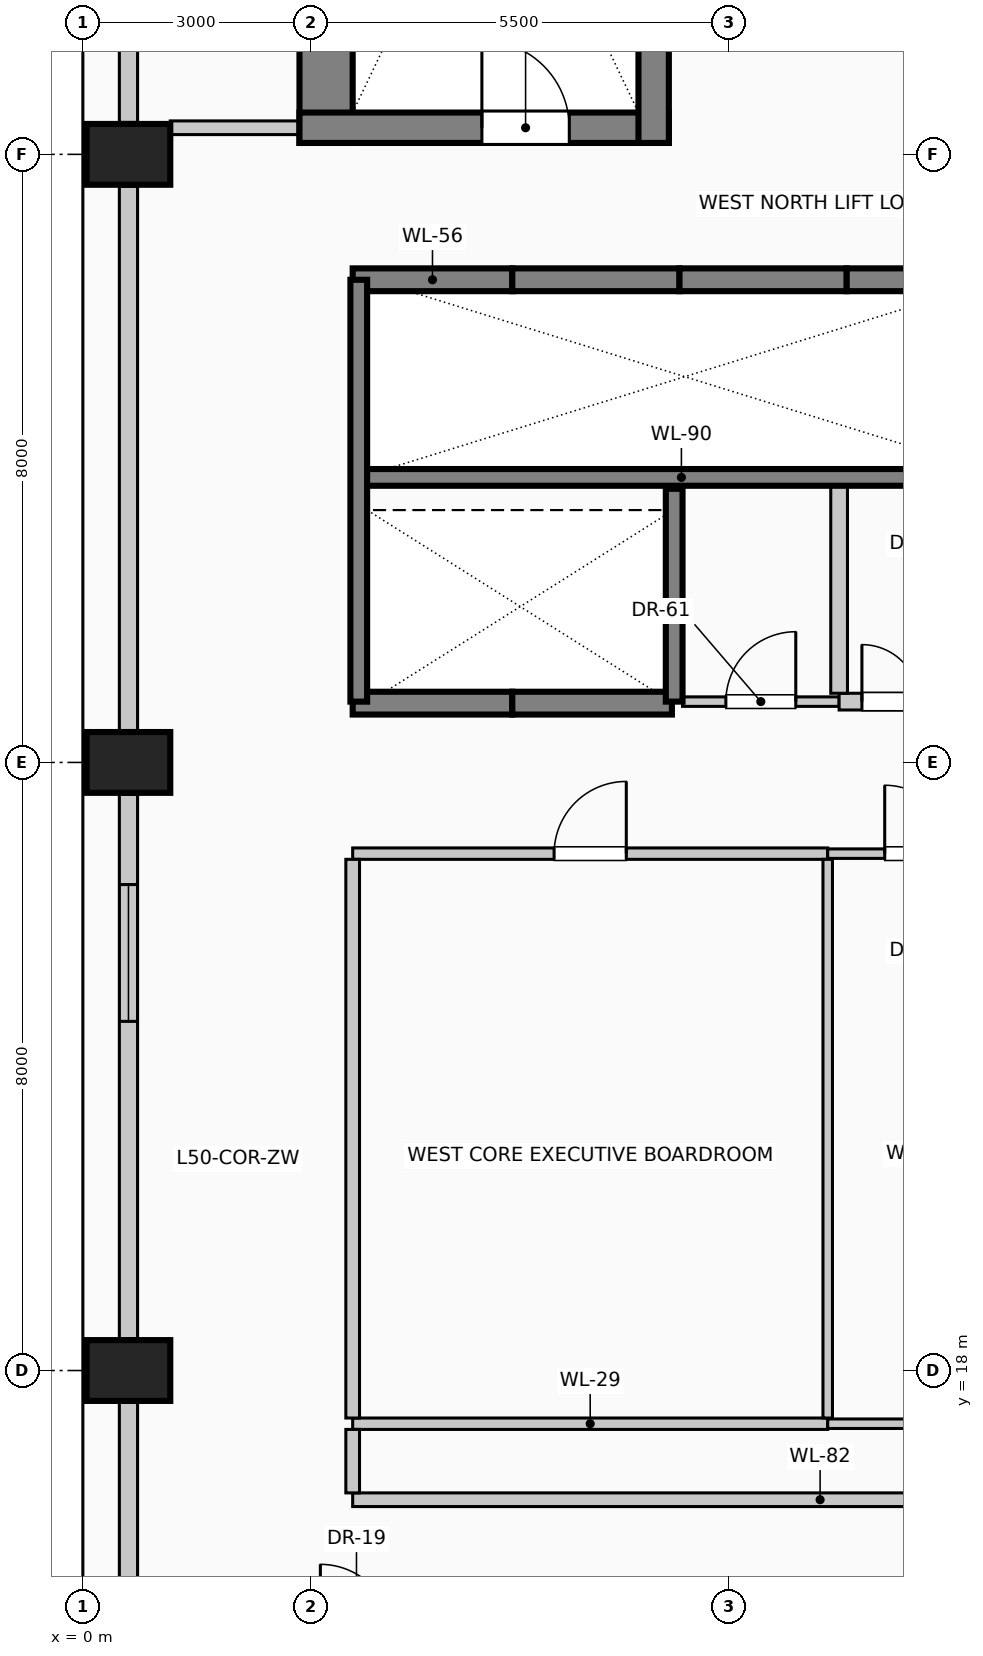
"""IFC4 building model, lengths in metres.
Left out: names, types, materials, properties, quantities, classifications, styles, units other than length and angle.
Written with IfcOpenShell. Run it as: python <this file> out.ifc"""

import sys

from ifc_helpers import new_model, si_unit, direction, frame, frame_2d, origin, origin_2d, place, context, subcontext, project, spatial, rectangle, extrude, element, fill, save


model = new_model("IFC4")
c1 = context("Model", 3, precision=1e-05, world=origin(), true_north=direction((0.0, 1.0)))
c2 = subcontext(c1, "Body", "Model", "MODEL_VIEW")
j1 = project(units=[si_unit("LENGTHUNIT", "METRE"), si_unit("PLANEANGLEUNIT", "RADIAN")], contexts=[c1])
p1 = place(None, origin())
s1 = spatial("IfcSite", under=j1, at=p1, CompositionType="ELEMENT")
p2 = place(p1, origin())
s2 = spatial("IfcBuilding", under=s1, at=p2, CompositionType="ELEMENT")
p3 = place(p2, frame((0.0, 0.0, 206.6)))
s3 = spatial("IfcBuildingStorey", under=s2, at=p3, CompositionType="ELEMENT", Elevation=206.6)
p4 = place(p3, frame((3.2, 34.15, 0.0), z_axis=(0.0, 0.0, 1.0), x_axis=(0.0, 1.0, 0.0)))
e1 = element("IfcWall", 1, at=p4, inside=s3, PredefinedType="SHEAR", context=c2, shape_type="SweptSolid", body=[
    extrude(rectangle(XDim=8.98, YDim=0.7, at=frame_2d((4.49, 0.0))), origin(), (0.0, 0.0, 1.0), 4.0),
])
p5 = place(p3, frame((2.85, 34.35, 0.0), z_axis=(0.0, 0.0, 1.0), x_axis=(1.0, 0.0, 0.0)))
e2 = element("IfcWall", 2, at=p5, inside=s3, PredefinedType="SHEAR", context=c2, shape_type="SweptSolid", body=[
    extrude(rectangle(XDim=4.86, YDim=0.4, at=frame_2d((2.43, 0.0))), origin(), (0.0, 0.0, 1.0), 4.0),
])
p6 = place(p5, frame((2.4, 0.0, 0.0)))
e3 = element("IfcOpeningElement", 3, at=p6, cuts=e2, PredefinedType="OPENING", context=c2, shape_type="SweptSolid", body=[
    extrude(rectangle(XDim=1.15, YDim=2.2, at=frame_2d((0.575, 1.1))), frame((0.0, 0.21, 0.0), z_axis=(0.0, -1.0, 0.0), x_axis=(1.0, 0.0, 0.0)), (0.0, 0.0, 1.0), 0.42),
])
p7 = place(p3, frame((7.51, 34.15, 0.0), z_axis=(0.0, 0.0, 1.0), x_axis=(0.0, 1.0, 0.0)))
e4 = element("IfcWall", 4, at=p7, inside=s3, PredefinedType="SHEAR", context=c2, shape_type="SweptSolid", body=[
    extrude(rectangle(XDim=8.98, YDim=0.4, at=frame_2d((4.49, 0.0))), origin(), (0.0, 0.0, 1.0), 4.0),
])
for number, where, z_axis, x_axis in (
    (5, (0.6, 18.0, 0.0), (0.0, 0.0, 1.0), (0.0, 1.0, 0.0)),
    (6, (0.6, 26.0, 0.0), (0.0, 0.0, 1.0), (0.0, 1.0, 0.0)),
    (7, (0.6, 34.0, 0.0), (0.0, 0.0, 1.0), (0.0, 1.0, 0.0)),
):
    element("IfcColumn", number, at=place(p3, frame(where, z_axis=z_axis, x_axis=x_axis)), inside=s3, PredefinedType="COLUMN", context=c2, shape_type="SweptSolid", body=[
        extrude(rectangle(XDim=0.8, YDim=1.1, at=origin_2d()), origin(), (0.0, 0.0, 1.0), 4.0),
    ])
p8 = place(p3, frame((0.6, 10.42, 0.0), z_axis=(0.0, 0.0, 1.0), x_axis=(0.0, 1.0, 0.0)))
e8 = element("IfcWall", 8, at=p8, inside=s3, PredefinedType="SOLIDWALL", context=c2, shape_type="SweptSolid", body=[
    extrude(rectangle(XDim=7.16, YDim=0.24, at=frame_2d((3.58, 0.0))), origin(), (0.0, 0.0, 1.0), 3.0),
])
p9 = place(p8, frame((1.187, 0.0, 0.42)))
e9 = element("IfcOpeningElement", 9, at=p9, cuts=e8, PredefinedType="OPENING", context=c2, shape_type="SweptSolid", body=[
    extrude(rectangle(XDim=1.8, YDim=2.2, at=frame_2d((0.9, 1.1))), frame((0.0, 0.13, 0.0), z_axis=(0.0, -1.0, 0.0), x_axis=(1.0, 0.0, 0.0)), (0.0, 0.0, 1.0), 0.26),
])
p10 = place(p3, frame((0.6, 18.42, 0.0), z_axis=(0.0, 0.0, 1.0), x_axis=(0.0, 1.0, 0.0)))
e10 = element("IfcWall", 10, at=p10, inside=s3, PredefinedType="SOLIDWALL", context=c2, shape_type="SweptSolid", body=[
    extrude(rectangle(XDim=7.16, YDim=0.24, at=frame_2d((3.58, 0.0))), origin(), (0.0, 0.0, 1.0), 3.0),
])
p11 = place(p10, frame((4.173, 0.0, 0.42)))
e11 = element("IfcOpeningElement", 11, at=p11, cuts=e10, PredefinedType="OPENING", context=c2, shape_type="SweptSolid", body=[
    extrude(rectangle(XDim=1.8, YDim=2.2, at=frame_2d((0.9, 1.1))), frame((0.0, 0.13, 0.0), z_axis=(0.0, -1.0, 0.0), x_axis=(1.0, 0.0, 0.0)), (0.0, 0.0, 1.0), 0.26),
])
p12 = place(p3, frame((0.6, 26.42, 0.0), z_axis=(0.0, 0.0, 1.0), x_axis=(0.0, 1.0, 0.0)))
e12 = element("IfcWall", 12, at=p12, inside=s3, PredefinedType="SOLIDWALL", context=c2, shape_type="SweptSolid", body=[
    extrude(rectangle(XDim=7.16, YDim=0.24, at=frame_2d((3.58, 0.0))), origin(), (0.0, 0.0, 1.0), 3.0),
])
p13 = place(p3, frame((0.6, 34.42, 0.0), z_axis=(0.0, 0.0, 1.0), x_axis=(0.0, 1.0, 0.0)))
e13 = element("IfcWall", 13, at=p13, inside=s3, PredefinedType="SOLIDWALL", context=c2, shape_type="SweptSolid", body=[
    extrude(rectangle(XDim=7.56, YDim=0.24, at=frame_2d((3.78, 0.0))), origin(), (0.0, 0.0, 1.0), 3.0),
])
p14 = place(p3, frame((3.55, 32.35, 0.0), z_axis=(0.0, 0.0, 1.0), x_axis=(1.0, 0.0, 0.0)))
e14 = element("IfcWall", 14, at=p14, inside=s3, PredefinedType="SOLIDWALL", context=c2, shape_type="SweptSolid", body=[
    extrude(rectangle(XDim=2.1, YDim=0.3, at=frame_2d((1.05, 0.0))), origin(), (0.0, 0.0, 1.0), 4.0),
])
p15 = place(p3, frame((5.65, 32.35, 0.0), z_axis=(0.0, 0.0, 1.0), x_axis=(1.0, 0.0, 0.0)))
e15 = element("IfcWall", 15, at=p15, inside=s3, PredefinedType="SOLIDWALL", context=c2, shape_type="SweptSolid", body=[
    extrude(rectangle(XDim=2.2, YDim=0.3, at=frame_2d((1.1, 0.0))), origin(), (0.0, 0.0, 1.0), 4.0),
])
p16 = place(p3, frame((7.85, 32.35, 0.0), z_axis=(0.0, 0.0, 1.0), x_axis=(1.0, 0.0, 0.0)))
e16 = element("IfcWall", 16, at=p16, inside=s3, PredefinedType="SOLIDWALL", context=c2, shape_type="SweptSolid", body=[
    extrude(rectangle(XDim=2.2, YDim=0.3, at=frame_2d((1.1, 0.0))), origin(), (0.0, 0.0, 1.0), 4.0),
])
p17 = place(p3, frame((10.05, 32.35, 0.0), z_axis=(0.0, 0.0, 1.0), x_axis=(1.0, 0.0, 0.0)))
e17 = element("IfcWall", 17, at=p17, inside=s3, PredefinedType="SOLIDWALL", context=c2, shape_type="SweptSolid", body=[
    extrude(rectangle(XDim=2.15, YDim=0.3, at=frame_2d((1.075, 0.0))), origin(), (0.0, 0.0, 1.0), 4.0),
])
p18 = place(p3, frame((5.65, 26.78, 0.0), z_axis=(0.0, 0.0, 1.0), x_axis=(-1.0, 0.0, 0.0)))
e18 = element("IfcWall", 18, at=p18, inside=s3, PredefinedType="SOLIDWALL", context=c2, shape_type="SweptSolid", body=[
    extrude(rectangle(XDim=2.1, YDim=0.3, at=frame_2d((1.05, 0.0))), origin(), (0.0, 0.0, 1.0), 4.0),
])
p19 = place(p3, frame((7.75, 26.78, 0.0), z_axis=(0.0, 0.0, 1.0), x_axis=(-1.0, 0.0, 0.0)))
e19 = element("IfcWall", 19, at=p19, inside=s3, PredefinedType="SOLIDWALL", context=c2, shape_type="SweptSolid", body=[
    extrude(rectangle(XDim=2.1, YDim=0.3, at=frame_2d((1.05, 0.0))), origin(), (0.0, 0.0, 1.0), 4.0),
])
p20 = place(p3, frame((3.55, 29.75, 0.0), z_axis=(0.0, 0.0, 1.0), x_axis=(1.0, 0.0, 0.0)))
e20 = element("IfcWall", 20, at=p20, inside=s3, PredefinedType="SOLIDWALL", context=c2, shape_type="SweptSolid", body=[
    extrude(rectangle(XDim=8.65, YDim=0.22, at=frame_2d((4.325, 0.0))), origin(), (0.0, 0.0, 1.0), 4.0),
])
p21 = place(p3, frame((3.63, 26.8, 0.0), z_axis=(0.0, 0.0, 1.0), x_axis=(0.0, 1.0, 0.0)))
e21 = element("IfcWall", 21, at=p21, inside=s3, PredefinedType="SOLIDWALL", context=c2, shape_type="SweptSolid", body=[
    extrude(rectangle(XDim=5.55, YDim=0.22, at=frame_2d((2.775, 0.0))), origin(), (0.0, 0.0, 1.0), 4.0),
])
p22 = place(p3, frame((7.78, 26.8, 0.0), z_axis=(0.0, 0.0, 1.0), x_axis=(0.0, 1.0, 0.0)))
e22 = element("IfcWall", 22, at=p22, inside=s3, PredefinedType="SOLIDWALL", context=c2, shape_type="SweptSolid", body=[
    extrude(rectangle(XDim=2.8, YDim=0.22, at=frame_2d((1.4, 0.0))), origin(), (0.0, 0.0, 1.0), 4.0),
])
p23 = place(p3, frame((3.55, 16.3, 0.0), z_axis=(0.0, 0.0, 1.0), x_axis=(1.0, 0.0, 0.0)))
e23 = element("IfcWall", 23, at=p23, inside=s3, PredefinedType="PARTITIONING", context=c2, shape_type="SweptSolid", body=[
    extrude(rectangle(XDim=12.3, YDim=0.18, at=frame_2d((6.15, 0.0))), origin(), (0.0, 0.0, 1.0), 3.75),
])
p24 = place(p3, frame((3.55, 17.3, 0.0), z_axis=(0.0, 0.0, 1.0), x_axis=(1.0, 0.0, 0.0)))
e24 = element("IfcWall", 24, at=p24, inside=s3, PredefinedType="PARTITIONING", context=c2, shape_type="SweptSolid", body=[
    extrude(rectangle(XDim=6.25, YDim=0.15, at=frame_2d((3.125, 0.0))), origin(), (0.0, 0.0, 1.0), 3.75),
])
p25 = place(p3, frame((9.8, 17.3, 0.0), z_axis=(0.0, 0.0, 1.0), x_axis=(1.0, 0.0, 0.0)))
e25 = element("IfcWall", 25, at=p25, inside=s3, PredefinedType="PARTITIONING", context=c2, shape_type="SweptSolid", body=[
    extrude(rectangle(XDim=6.05, YDim=0.125, at=frame_2d((3.025, 0.0))), origin(), (0.0, 0.0, 1.0), 3.75),
])
p26 = place(p3, frame((3.55, 24.8, 0.0), z_axis=(0.0, 0.0, 1.0), x_axis=(1.0, 0.0, 0.0)))
e26 = element("IfcWall", 26, at=p26, inside=s3, PredefinedType="PARTITIONING", context=c2, shape_type="SweptSolid", body=[
    extrude(rectangle(XDim=6.25, YDim=0.15, at=frame_2d((3.125, 0.0))), origin(), (0.0, 0.0, 1.0), 3.75),
])
p27 = place(p26, frame((2.65, 0.0, 0.0)))
e27 = element("IfcOpeningElement", 27, at=p27, cuts=e26, PredefinedType="OPENING", context=c2, shape_type="SweptSolid", body=[
    extrude(rectangle(XDim=0.95, YDim=2.15, at=frame_2d((0.475, 1.075))), frame((0.0, 0.085, 0.0), z_axis=(0.0, -1.0, 0.0), x_axis=(1.0, 0.0, 0.0)), (0.0, 0.0, 1.0), 0.17),
])
p28 = place(p3, frame((9.8, 24.8, 0.0), z_axis=(0.0, 0.0, 1.0), x_axis=(1.0, 0.0, 0.0)))
e28 = element("IfcWall", 28, at=p28, inside=s3, PredefinedType="PARTITIONING", context=c2, shape_type="SweptSolid", body=[
    extrude(rectangle(XDim=2.4, YDim=0.125, at=frame_2d((1.2, 0.0))), origin(), (0.0, 0.0, 1.0), 3.75),
])
p29 = place(p28, frame((0.75, 0.0, 0.0)))
e29 = element("IfcOpeningElement", 29, at=p29, cuts=e28, PredefinedType="OPENING", context=c2, shape_type="SweptSolid", body=[
    extrude(rectangle(XDim=0.9, YDim=2.1, at=frame_2d((0.45, 1.05))), frame((0.0, 0.073, 0.0), z_axis=(0.0, -1.0, 0.0), x_axis=(1.0, 0.0, 0.0)), (0.0, 0.0, 1.0), 0.145),
])
p30 = place(p3, frame((7.89, 26.8, 0.0), z_axis=(0.0, 0.0, 1.0), x_axis=(1.0, 0.0, 0.0)))
e30 = element("IfcWall", 30, at=p30, inside=s3, PredefinedType="PARTITIONING", context=c2, shape_type="SweptSolid", body=[
    extrude(rectangle(XDim=2.06, YDim=0.125, at=frame_2d((1.03, 0.0))), origin(), (0.0, 0.0, 1.0), 3.75),
])
p31 = place(p30, frame((0.57, 0.0, 0.0)))
e31 = element("IfcOpeningElement", 31, at=p31, cuts=e30, PredefinedType="OPENING", context=c2, shape_type="SweptSolid", body=[
    extrude(rectangle(XDim=0.92, YDim=2.1, at=frame_2d((0.46, 1.05))), frame((0.0, 0.073, 0.0), z_axis=(0.0, -1.0, 0.0), x_axis=(1.0, 0.0, 0.0)), (0.0, 0.0, 1.0), 0.145),
])
p32 = place(p3, frame((9.95, 26.8, 0.0), z_axis=(0.0, 0.0, 1.0), x_axis=(1.0, 0.0, 0.0)))
e32 = element("IfcWall", 32, at=p32, inside=s3, PredefinedType="PARTITIONING", context=c2, shape_type="SweptSolid", body=[
    extrude(rectangle(XDim=2.1, YDim=0.22, at=frame_2d((1.05, 0.0))), origin(), (0.0, 0.0, 1.0), 3.75),
])
p33 = place(p32, frame((0.3, 0.0, 0.0)))
e33 = element("IfcOpeningElement", 33, at=p33, cuts=e32, PredefinedType="OPENING", context=c2, shape_type="SweptSolid", body=[
    extrude(rectangle(XDim=1.5, YDim=2.25, at=frame_2d((0.75, 1.125))), frame((0.0, 0.12, 0.0), z_axis=(0.0, -1.0, 0.0), x_axis=(1.0, 0.0, 0.0)), (0.0, 0.0, 1.0), 0.24),
])
p34 = place(p3, frame((1.15, 34.35, 0.0), z_axis=(0.0, 0.0, 1.0), x_axis=(1.0, 0.0, 0.0)))
e34 = element("IfcWall", 34, at=p34, inside=s3, PredefinedType="PARTITIONING", context=c2, shape_type="SweptSolid", body=[
    extrude(rectangle(XDim=1.7, YDim=0.18, at=frame_2d((0.85, 0.0))), origin(), (0.0, 0.0, 1.0), 3.75),
])
p35 = place(p3, frame((3.55, 16.39, 0.0), z_axis=(0.0, 0.0, 1.0), x_axis=(0.0, 1.0, 0.0)))
e35 = element("IfcWall", 35, at=p35, inside=s3, PredefinedType="PARTITIONING", context=c2, shape_type="SweptSolid", body=[
    extrude(rectangle(XDim=0.835, YDim=0.18, at=frame_2d((0.417, 0.0))), origin(), (0.0, 0.0, 1.0), 3.75),
])
p36 = place(p3, frame((3.55, 17.375, 0.0), z_axis=(0.0, 0.0, 1.0), x_axis=(0.0, 1.0, 0.0)))
e36 = element("IfcWall", 36, at=p36, inside=s3, PredefinedType="PARTITIONING", context=c2, shape_type="SweptSolid", body=[
    extrude(rectangle(XDim=7.35, YDim=0.18, at=frame_2d((3.675, 0.0))), origin(), (0.0, 0.0, 1.0), 3.75),
])
p37 = place(p3, frame((9.8, 17.375, 0.0), z_axis=(0.0, 0.0, 1.0), x_axis=(0.0, 1.0, 0.0)))
e37 = element("IfcWall", 37, at=p37, inside=s3, PredefinedType="PARTITIONING", context=c2, shape_type="SweptSolid", body=[
    extrude(rectangle(XDim=7.35, YDim=0.125, at=frame_2d((3.675, 0.0))), origin(), (0.0, 0.0, 1.0), 3.75),
])
p38 = place(p3, frame((9.95, 26.91, 0.0), z_axis=(0.0, 0.0, 1.0), x_axis=(0.0, 1.0, 0.0)))
e38 = element("IfcWall", 38, at=p38, inside=s3, PredefinedType="PARTITIONING", context=c2, shape_type="SweptSolid", body=[
    extrude(rectangle(XDim=2.73, YDim=0.22, at=frame_2d((1.365, 0.0))), origin(), (0.0, 0.0, 1.0), 3.75),
])
p39 = place(p11, origin())
e39 = element("IfcWindow", 39, at=p39, inside=s3, PartitioningType="SINGLE_PANEL", PredefinedType="WINDOW", context=c2, shape_type="SweptSolid", body=[
    extrude(rectangle(XDim=1.8, YDim=2.2, at=frame_2d((0.9, 1.1))), frame((0.0, 0.03, 0.0), z_axis=(0.0, -1.0, 0.0), x_axis=(1.0, 0.0, 0.0)), (0.0, 0.0, 1.0), 0.06),
])
fill(e11, e39)
p40 = place(p6, origin())
e40 = element("IfcDoor", 40, at=p40, inside=s3, OperationType="SINGLE_SWING_LEFT", PredefinedType="DOOR", context=c2, shape_type="SweptSolid", body=[
    extrude(rectangle(XDim=1.15, YDim=2.2, at=frame_2d((0.575, 1.1))), frame((0.0, 0.025, 0.0), z_axis=(0.0, -1.0, 0.0), x_axis=(1.0, 0.0, 0.0)), (0.0, 0.0, 1.0), 0.05),
])
fill(e3, e40)
p41 = place(p27, origin())
e41 = element("IfcDoor", 41, at=p41, inside=s3, OperationType="SINGLE_SWING_RIGHT", PredefinedType="DOOR", context=c2, shape_type="SweptSolid", body=[
    extrude(rectangle(XDim=0.95, YDim=2.15, at=frame_2d((0.475, 1.075))), frame((0.0, 0.025, 0.0), z_axis=(0.0, -1.0, 0.0), x_axis=(1.0, 0.0, 0.0)), (0.0, 0.0, 1.0), 0.05),
])
fill(e27, e41)
p42 = place(p29, origin())
e42 = element("IfcDoor", 42, at=p42, inside=s3, OperationType="SINGLE_SWING_LEFT", PredefinedType="DOOR", context=c2, shape_type="SweptSolid", body=[
    extrude(rectangle(XDim=0.9, YDim=2.1, at=frame_2d((0.45, 1.05))), frame((0.0, 0.025, 0.0), z_axis=(0.0, -1.0, 0.0), x_axis=(1.0, 0.0, 0.0)), (0.0, 0.0, 1.0), 0.05),
])
fill(e29, e42)
p43 = place(p31, origin())
e43 = element("IfcDoor", 43, at=p43, inside=s3, OperationType="SINGLE_SWING_RIGHT", PredefinedType="DOOR", context=c2, shape_type="SweptSolid", body=[
    extrude(rectangle(XDim=0.92, YDim=2.1, at=frame_2d((0.46, 1.05))), frame((0.0, 0.025, 0.0), z_axis=(0.0, -1.0, 0.0), x_axis=(1.0, 0.0, 0.0)), (0.0, 0.0, 1.0), 0.05),
])
fill(e31, e43)
p44 = place(p33, origin())
e44 = element("IfcDoor", 44, at=p44, inside=s3, OperationType="DOUBLE_DOOR_SINGLE_SWING", PredefinedType="DOOR", context=c2, shape_type="SweptSolid", body=[
    extrude(rectangle(XDim=1.5, YDim=2.25, at=frame_2d((0.75, 1.125))), frame((0.0, 0.025, 0.0), z_axis=(0.0, -1.0, 0.0), x_axis=(1.0, 0.0, 0.0)), (0.0, 0.0, 1.0), 0.05),
])
fill(e33, e44)
save(model, sys.argv[1])
